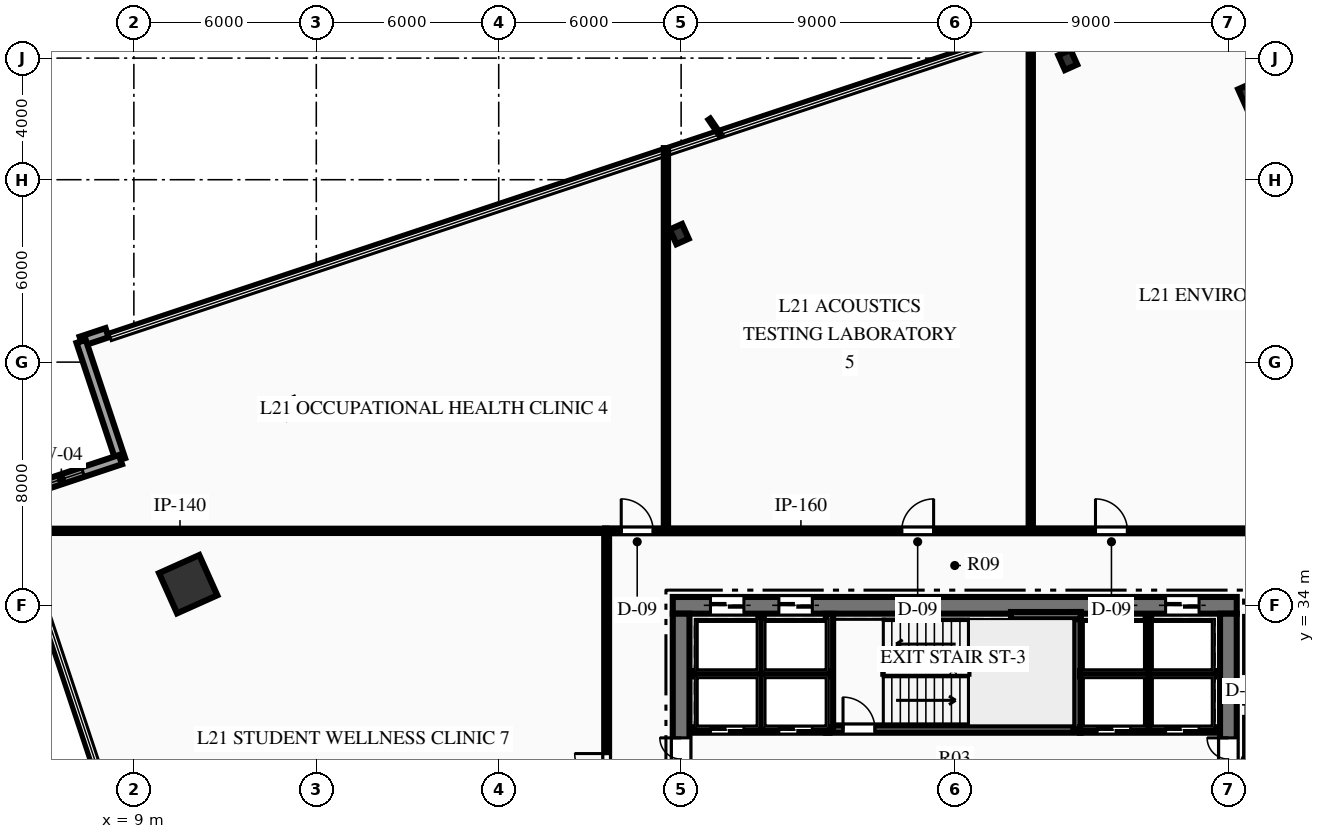
"""IFC4 building model, lengths in metres.
Left out: names, types, materials, properties, quantities, classifications, styles, units other than length and angle.
Written with IfcOpenShell. Run it as: python <this file> out.ifc"""

import sys

from ifc_helpers import new_model, si_unit, direction, frame, frame_2d, origin, origin_2d, place, context, subcontext, project, spatial, rectangle, hollow_rectangle, i_section, extrude, element, fill, save


model = new_model("IFC4")
c1 = context("Model", 3, precision=1e-05, world=origin(), true_north=direction((0.0, 1.0)))
c2 = subcontext(c1, "Body", "Model", "MODEL_VIEW")
j1 = project(units=[si_unit("LENGTHUNIT", "METRE"), si_unit("PLANEANGLEUNIT", "RADIAN")], contexts=[c1])
p1 = place(None, origin())
s1 = spatial("IfcSite", under=j1, at=p1, CompositionType="ELEMENT")
p2 = place(p1, origin())
s2 = spatial("IfcBuilding", under=s1, at=p2, CompositionType="ELEMENT")
p3 = place(p2, frame((0.0, 0.0, 90.45)))
s3 = spatial("IfcBuildingStorey", under=s2, at=p3, CompositionType="ELEMENT", Elevation=90.45)
p4 = place(p3, frame((26.725, 34.0, 0.0), z_axis=(0.0, 0.0, 1.0), x_axis=(1.0, 0.0, 0.0)))
e1 = element("IfcWall", 1, at=p4, inside=s3, PredefinedType="SHEAR", context=c2, shape_type="SweptSolid", body=[
    extrude(rectangle(XDim=18.55, YDim=0.55, at=frame_2d((9.275, 0.0))), origin(), (0.0, 0.0, 1.0), 3.75),
])
p5 = place(p4, frame((1.24, 0.0, 0.0)))
e2 = element("IfcOpeningElement", 2, at=p5, cuts=e1, PredefinedType="OPENING", context=c2, shape_type="SweptSolid", body=[
    extrude(rectangle(XDim=1.1, YDim=2.15, at=frame_2d((0.55, 1.075))), frame((0.0, 0.285, 0.0), z_axis=(0.0, -1.0, 0.0), x_axis=(1.0, 0.0, 0.0)), (0.0, 0.0, 1.0), 0.57),
])
p6 = place(p4, frame((3.49, 0.0, 0.0)))
e3 = element("IfcOpeningElement", 3, at=p6, cuts=e1, PredefinedType="OPENING", context=c2, shape_type="SweptSolid", body=[
    extrude(rectangle(XDim=1.1, YDim=2.15, at=frame_2d((0.55, 1.075))), frame((0.0, 0.285, 0.0), z_axis=(0.0, -1.0, 0.0), x_axis=(1.0, 0.0, 0.0)), (0.0, 0.0, 1.0), 0.57),
])
p7 = place(p4, frame((13.96, 0.0, 0.0)))
e4 = element("IfcOpeningElement", 4, at=p7, cuts=e1, PredefinedType="OPENING", context=c2, shape_type="SweptSolid", body=[
    extrude(rectangle(XDim=1.1, YDim=2.15, at=frame_2d((0.55, 1.075))), frame((0.0, 0.285, 0.0), z_axis=(0.0, -1.0, 0.0), x_axis=(1.0, 0.0, 0.0)), (0.0, 0.0, 1.0), 0.57),
])
p8 = place(p4, frame((16.21, 0.0, 0.0)))
e5 = element("IfcOpeningElement", 5, at=p8, cuts=e1, PredefinedType="OPENING", context=c2, shape_type="SweptSolid", body=[
    extrude(rectangle(XDim=1.1, YDim=2.15, at=frame_2d((0.55, 1.075))), frame((0.0, 0.285, 0.0), z_axis=(0.0, -1.0, 0.0), x_axis=(1.0, 0.0, 0.0)), (0.0, 0.0, 1.0), 0.57),
])
p9 = place(p3, frame((27.0, 18.275, 0.0), z_axis=(0.0, 0.0, 1.0), x_axis=(0.0, 1.0, 0.0)))
e6 = element("IfcWall", 6, at=p9, inside=s3, PredefinedType="SHEAR", context=c2, shape_type="SweptSolid", body=[
    extrude(rectangle(XDim=15.45, YDim=0.55, at=frame_2d((7.725, 0.0))), origin(), (0.0, 0.0, 1.0), 3.75),
])
p10 = place(p9, frame((9.965, 0.0, 0.0)))
e7 = element("IfcOpeningElement", 7, at=p10, cuts=e6, PredefinedType="OPENING", context=c2, shape_type="SweptSolid", body=[
    extrude(rectangle(XDim=1.4, YDim=2.2, at=frame_2d((0.7, 1.1))), frame((0.0, 0.285, 0.0), z_axis=(0.0, -1.0, 0.0), x_axis=(1.0, 0.0, 0.0)), (0.0, 0.0, 1.0), 0.57),
])
p11 = place(p3, frame((45.0, 18.275, 0.0), z_axis=(0.0, 0.0, 1.0), x_axis=(0.0, 1.0, 0.0)))
e8 = element("IfcWall", 8, at=p11, inside=s3, PredefinedType="SHEAR", context=c2, shape_type="SweptSolid", body=[
    extrude(rectangle(XDim=15.45, YDim=0.55, at=frame_2d((7.725, 0.0))), origin(), (0.0, 0.0, 1.0), 3.75),
])
p12 = place(p11, frame((9.965, 0.0, 0.0)))
e9 = element("IfcOpeningElement", 9, at=p12, cuts=e8, PredefinedType="OPENING", context=c2, shape_type="SweptSolid", body=[
    extrude(rectangle(XDim=1.4, YDim=2.2, at=frame_2d((0.7, 1.1))), frame((0.0, 0.285, 0.0), z_axis=(0.0, -1.0, 0.0), x_axis=(1.0, 0.0, 0.0)), (0.0, 0.0, 1.0), 0.57),
])
p13 = place(p3, frame((31.76, 29.93, 0.0), z_axis=(0.0, 0.0, 1.0), x_axis=(1.0, 0.0, 0.0)))
e10 = element("IfcWall", 10, at=p13, inside=s3, PredefinedType="SHEAR", context=c2, shape_type="SweptSolid", body=[
    extrude(rectangle(XDim=8.38, YDim=0.24, at=frame_2d((4.19, 0.0))), origin(), (0.0, 0.0, 1.0), 3.75),
])
p14 = place(p13, frame((0.565, 0.0, 0.0)))
e11 = element("IfcOpeningElement", 11, at=p14, cuts=e10, PredefinedType="OPENING", context=c2, shape_type="SweptSolid", body=[
    extrude(rectangle(XDim=1.05, YDim=2.15, at=frame_2d((0.525, 1.075))), frame((0.0, 0.13, 0.0), z_axis=(0.0, -1.0, 0.0), x_axis=(1.0, 0.0, 0.0)), (0.0, 0.0, 1.0), 0.26),
])
p15 = place(p3, frame((31.88, 29.93, 0.0), z_axis=(0.0, 0.0, 1.0), x_axis=(0.0, 1.0, 0.0)))
e12 = element("IfcWall", 12, at=p15, inside=s3, PredefinedType="SHEAR", context=c2, shape_type="SweptSolid", body=[
    extrude(rectangle(XDim=3.79, YDim=0.24, at=frame_2d((1.895, 0.0))), origin(), (0.0, 0.0, 1.0), 3.75),
])
p16 = place(p3, frame((40.02, 29.93, 0.0), z_axis=(0.0, 0.0, 1.0), x_axis=(0.0, 1.0, 0.0)))
e13 = element("IfcWall", 13, at=p16, inside=s3, PredefinedType="SHEAR", context=c2, shape_type="SweptSolid", body=[
    extrude(rectangle(XDim=3.85, YDim=0.24, at=frame_2d((1.925, 0.0))), origin(), (0.0, 0.0, 1.0), 3.75),
])
p17 = place(p3, frame((37.85, 33.66, 0.0), z_axis=(0.0, 0.0, 1.0), x_axis=(1.0, 0.0, 0.0)))
e14 = element("IfcWall", 14, at=p17, inside=s3, PredefinedType="SHEAR", context=c2, shape_type="SweptSolid", body=[
    extrude(rectangle(XDim=2.29, YDim=0.24, at=frame_2d((1.145, 0.0))), origin(), (0.0, 0.0, 1.0), 3.75),
])
for number, where, z_axis, x_axis in (
    (15, (46.281, 50.61, 0.0), (0.0, 0.0, 1.0), (0.912, 0.409, 0.0)),
    (16, (10.786, 34.695, 0.0), (0.0, 0.0, 1.0), (0.912, 0.409, 0.0)),
):
    element("IfcColumn", number, at=place(p3, frame(where, z_axis=z_axis, x_axis=x_axis)), inside=s3, PredefinedType="COLUMN", context=c2, shape_type="SweptSolid", body=[
        extrude(hollow_rectangle(XDim=1.45, YDim=1.45, WallThickness=0.07, at=origin_2d()), origin(), (0.0, 0.0, 1.0), 3.75),
    ])
for number, where, z_axis, x_axis in (
    (17, (39.716, 51.941, 0.0), (0.0, 0.0, 1.0), (0.912, 0.409, 0.0)),
    (18, (26.938, 46.211, 0.0), (0.0, 0.0, 1.0), (0.912, 0.409, 0.0)),
    (19, (14.159, 40.482, 0.0), (0.0, 0.0, 1.0), (0.912, 0.409, 0.0)),
):
    element("IfcColumn", number, at=place(p3, frame(where, z_axis=z_axis, x_axis=x_axis)), inside=s3, PredefinedType="COLUMN", context=c2, shape_type="SweptSolid", body=[
        extrude(i_section(OverallWidth=0.442, OverallDepth=0.531, WebThickness=0.066, FlangeThickness=0.106, at=origin_2d()), origin(), (0.0, 0.0, 1.0), 3.75),
    ])
p18 = place(p3, frame((7.265, 42.683, 0.0), z_axis=(0.0, 0.0, 1.0), x_axis=(0.948845924708, 0.315739467227, 0.0)))
e20 = element("IfcWall", 20, at=p18, inside=s3, PredefinedType="STANDARD", context=c2, shape_type="SweptSolid", body=[
    extrude(rectangle(XDim=0.9, YDim=0.32, at=frame_2d((0.45, 0.0))), origin(), (0.0, 0.0, 1.0), 3.45),
])
p19 = place(p3, frame((8.559, 38.792, 0.0), z_axis=(0.0, 0.0, 1.0), x_axis=(-0.315602447205, 0.948891508719, 0.0)))
e21 = element("IfcWall", 21, at=p19, inside=s3, PredefinedType="STANDARD", context=c2, shape_type="SweptSolid", body=[
    extrude(rectangle(XDim=4.1, YDim=0.32, at=frame_2d((2.05, 0.0))), origin(), (0.0, 0.0, 1.0), 3.45),
])
p20 = place(p3, frame((4.669, 37.498, 0.0), z_axis=(0.0, 0.0, 1.0), x_axis=(0.948891508719, 0.315602447205, 0.0)))
e22 = element("IfcWall", 22, at=p20, inside=s3, PredefinedType="STANDARD", context=c2, shape_type="SweptSolid", body=[
    extrude(rectangle(XDim=4.1, YDim=0.32, at=frame_2d((2.05, 0.0))), origin(), (0.0, 0.0, 1.0), 3.45),
])
p21 = place(p20, frame((1.3, 0.0, 0.85)))
e23 = element("IfcOpeningElement", 23, at=p21, cuts=e22, PredefinedType="OPENING", context=c2, shape_type="SweptSolid", body=[
    extrude(rectangle(XDim=1.5, YDim=2.1, at=frame_2d((0.75, 1.05))), frame((0.0, 0.17, 0.0), z_axis=(0.0, -1.0, 0.0), x_axis=(1.0, 0.0, 0.0)), (0.0, 0.0, 1.0), 0.34),
])
p22 = place(p3, frame((27.45, 29.9, 0.0), z_axis=(0.0, 0.0, 1.0), x_axis=(1.0, 0.0, 0.0)))
e24 = element("IfcWall", 24, at=p22, inside=s3, PredefinedType="PARTITIONING", context=c2, shape_type="SweptSolid", body=[
    extrude(rectangle(XDim=4.43, YDim=0.18, at=frame_2d((2.215, 0.0))), origin(), (0.0, 0.0, 1.0), 3.45),
])
p23 = place(p22, frame((0.515, 0.0, 0.0)))
e25 = element("IfcOpeningElement", 25, at=p23, cuts=e24, PredefinedType="OPENING", context=c2, shape_type="SweptSolid", body=[
    extrude(rectangle(XDim=1.1, YDim=2.15, at=frame_2d((0.55, 1.075))), frame((0.0, 0.1, 0.0), z_axis=(0.0, -1.0, 0.0), x_axis=(1.0, 0.0, 0.0)), (0.0, 0.0, 1.0), 0.2),
])
p24 = place(p22, frame((2.765, 0.0, 0.0)))
e26 = element("IfcOpeningElement", 26, at=p24, cuts=e24, PredefinedType="OPENING", context=c2, shape_type="SweptSolid", body=[
    extrude(rectangle(XDim=1.1, YDim=2.15, at=frame_2d((0.55, 1.075))), frame((0.0, 0.1, 0.0), z_axis=(0.0, -1.0, 0.0), x_axis=(1.0, 0.0, 0.0)), (0.0, 0.0, 1.0), 0.2),
])
p25 = place(p3, frame((27.45, 31.75, 0.0), z_axis=(0.0, 0.0, 1.0), x_axis=(1.0, 0.0, 0.0)))
e27 = element("IfcWall", 27, at=p25, inside=s3, PredefinedType="PARTITIONING", context=c2, shape_type="SweptSolid", body=[
    extrude(rectangle(XDim=4.43, YDim=0.18, at=frame_2d((2.215, 0.0))), origin(), (0.0, 0.0, 1.0), 3.45),
])
p26 = place(p3, frame((29.63, 29.9, 0.0), z_axis=(0.0, 0.0, 1.0), x_axis=(0.0, 1.0, 0.0)))
e28 = element("IfcWall", 28, at=p26, inside=s3, PredefinedType="PARTITIONING", context=c2, shape_type="SweptSolid", body=[
    extrude(rectangle(XDim=3.75, YDim=0.18, at=frame_2d((1.875, 0.0))), origin(), (0.0, 0.0, 1.0), 3.45),
])
p27 = place(p3, frame((40.12, 29.9, 0.0), z_axis=(0.0, 0.0, 1.0), x_axis=(1.0, 0.0, 0.0)))
e29 = element("IfcWall", 29, at=p27, inside=s3, PredefinedType="PARTITIONING", context=c2, shape_type="SweptSolid", body=[
    extrude(rectangle(XDim=4.43, YDim=0.18, at=frame_2d((2.215, 0.0))), origin(), (0.0, 0.0, 1.0), 3.45),
])
p28 = place(p27, frame((0.565, 0.0, 0.0)))
e30 = element("IfcOpeningElement", 30, at=p28, cuts=e29, PredefinedType="OPENING", context=c2, shape_type="SweptSolid", body=[
    extrude(rectangle(XDim=1.1, YDim=2.15, at=frame_2d((0.55, 1.075))), frame((0.0, 0.1, 0.0), z_axis=(0.0, -1.0, 0.0), x_axis=(1.0, 0.0, 0.0)), (0.0, 0.0, 1.0), 0.2),
])
p29 = place(p27, frame((2.815, 0.0, 0.0)))
e31 = element("IfcOpeningElement", 31, at=p29, cuts=e29, PredefinedType="OPENING", context=c2, shape_type="SweptSolid", body=[
    extrude(rectangle(XDim=1.1, YDim=2.15, at=frame_2d((0.55, 1.075))), frame((0.0, 0.1, 0.0), z_axis=(0.0, -1.0, 0.0), x_axis=(1.0, 0.0, 0.0)), (0.0, 0.0, 1.0), 0.2),
])
p30 = place(p3, frame((40.12, 31.75, 0.0), z_axis=(0.0, 0.0, 1.0), x_axis=(1.0, 0.0, 0.0)))
e32 = element("IfcWall", 32, at=p30, inside=s3, PredefinedType="PARTITIONING", context=c2, shape_type="SweptSolid", body=[
    extrude(rectangle(XDim=4.43, YDim=0.18, at=frame_2d((2.215, 0.0))), origin(), (0.0, 0.0, 1.0), 3.45),
])
p31 = place(p3, frame((42.37, 29.9, 0.0), z_axis=(0.0, 0.0, 1.0), x_axis=(0.0, 1.0, 0.0)))
e33 = element("IfcWall", 33, at=p31, inside=s3, PredefinedType="PARTITIONING", context=c2, shape_type="SweptSolid", body=[
    extrude(rectangle(XDim=3.75, YDim=0.18, at=frame_2d((1.875, 0.0))), origin(), (0.0, 0.0, 1.0), 3.45),
])
p32 = place(p3, frame((24.5, 36.45, 0.0), z_axis=(0.0, 0.0, 1.0), x_axis=(1.0, 0.0, 0.0)))
e34 = element("IfcWall", 34, at=p32, inside=s3, PredefinedType="PARTITIONING", context=c2, shape_type="SweptSolid", body=[
    extrude(rectangle(XDim=23.0, YDim=0.16, at=frame_2d((11.5, 0.0))), origin(), (0.0, 0.0, 1.0), 3.45),
])
p33 = place(p32, frame((0.53, 0.0, 0.0)))
e35 = element("IfcOpeningElement", 35, at=p33, cuts=e34, PredefinedType="OPENING", context=c2, shape_type="SweptSolid", body=[
    extrude(rectangle(XDim=1.05, YDim=2.15, at=frame_2d((0.525, 1.075))), frame((0.0, 0.09, 0.0), z_axis=(0.0, -1.0, 0.0), x_axis=(1.0, 0.0, 0.0)), (0.0, 0.0, 1.0), 0.18),
])
p34 = place(p32, frame((9.755, 0.0, 0.0)))
e36 = element("IfcOpeningElement", 36, at=p34, cuts=e34, PredefinedType="OPENING", context=c2, shape_type="SweptSolid", body=[
    extrude(rectangle(XDim=1.05, YDim=2.15, at=frame_2d((0.525, 1.075))), frame((0.0, 0.09, 0.0), z_axis=(0.0, -1.0, 0.0), x_axis=(1.0, 0.0, 0.0)), (0.0, 0.0, 1.0), 0.18),
])
p35 = place(p32, frame((16.129, 0.0, 0.0)))
e37 = element("IfcOpeningElement", 37, at=p35, cuts=e34, PredefinedType="OPENING", context=c2, shape_type="SweptSolid", body=[
    extrude(rectangle(XDim=1.05, YDim=2.15, at=frame_2d((0.525, 1.075))), frame((0.0, 0.09, 0.0), z_axis=(0.0, -1.0, 0.0), x_axis=(1.0, 0.0, 0.0)), (0.0, 0.0, 1.0), 0.18),
])
p36 = place(p3, frame((24.55, 15.55, 0.0), z_axis=(0.0, 0.0, 1.0), x_axis=(0.0, 1.0, 0.0)))
e38 = element("IfcWall", 38, at=p36, inside=s3, PredefinedType="PARTITIONING", context=c2, shape_type="SweptSolid", body=[
    extrude(rectangle(XDim=20.9, YDim=0.16, at=frame_2d((10.45, 0.0))), origin(), (0.0, 0.0, 1.0), 3.45),
])
p37 = place(p36, frame((5.075, 0.0, 0.0)))
e39 = element("IfcOpeningElement", 39, at=p37, cuts=e38, PredefinedType="OPENING", context=c2, shape_type="SweptSolid", body=[
    extrude(rectangle(XDim=0.95, YDim=2.15, at=frame_2d((0.475, 1.075))), frame((0.0, 0.09, 0.0), z_axis=(0.0, -1.0, 0.0), x_axis=(1.0, 0.0, 0.0)), (0.0, 0.0, 1.0), 0.18),
])
p38 = place(p36, frame((12.524, 0.0, 0.0)))
e40 = element("IfcOpeningElement", 40, at=p38, cuts=e38, PredefinedType="OPENING", context=c2, shape_type="SweptSolid", body=[
    extrude(rectangle(XDim=1.05, YDim=2.15, at=frame_2d((0.525, 1.075))), frame((0.0, 0.09, 0.0), z_axis=(0.0, -1.0, 0.0), x_axis=(1.0, 0.0, 0.0)), (0.0, 0.0, 1.0), 0.18),
])
p39 = place(p3, frame((5.06, 36.45, 0.0), z_axis=(0.0, 0.0, 1.0), x_axis=(1.0, 0.0, 0.0)))
e41 = element("IfcWall", 41, at=p39, inside=s3, PredefinedType="PARTITIONING", context=c2, shape_type="SweptSolid", body=[
    extrude(rectangle(XDim=19.49, YDim=0.14, at=frame_2d((9.745, 0.0))), origin(), (0.0, 0.0, 1.0), 3.45),
])
p40 = place(p3, frame((26.5, 36.45, 0.0), z_axis=(0.0, 0.0, 1.0), x_axis=(0.0, 1.0, 0.0)))
e42 = element("IfcWall", 42, at=p40, inside=s3, PredefinedType="PARTITIONING", context=c2, shape_type="SweptSolid", body=[
    extrude(rectangle(XDim=12.589, YDim=0.14, at=frame_2d((6.295, 0.0))), origin(), (0.0, 0.0, 1.0), 3.45),
])
p41 = place(p3, frame((38.5, 36.45, 0.0), z_axis=(0.0, 0.0, 1.0), x_axis=(0.0, 1.0, 0.0)))
e43 = element("IfcWall", 43, at=p41, inside=s3, PredefinedType="PARTITIONING", context=c2, shape_type="SweptSolid", body=[
    extrude(rectangle(XDim=16.581, YDim=0.14, at=frame_2d((8.291, 0.0))), origin(), (0.0, 0.0, 1.0), 3.45),
])
p42 = place(p21, origin())
e44 = element("IfcWindow", 44, at=p42, inside=s3, PartitioningType="SINGLE_PANEL", PredefinedType="WINDOW", context=c2, shape_type="SweptSolid", body=[
    extrude(rectangle(XDim=1.5, YDim=2.1, at=frame_2d((0.75, 1.05))), frame((0.0, 0.03, 0.0), z_axis=(0.0, -1.0, 0.0), x_axis=(1.0, 0.0, 0.0)), (0.0, 0.0, 1.0), 0.06),
])
fill(e23, e44)
p43 = place(p14, origin())
e45 = element("IfcDoor", 45, at=p43, inside=s3, OperationType="SINGLE_SWING_LEFT", PredefinedType="DOOR", context=c2, shape_type="SweptSolid", body=[
    extrude(rectangle(XDim=1.05, YDim=2.15, at=frame_2d((0.525, 1.075))), frame((0.0, 0.025, 0.0), z_axis=(0.0, -1.0, 0.0), x_axis=(1.0, 0.0, 0.0)), (0.0, 0.0, 1.0), 0.05),
])
fill(e11, e45)
p44 = place(p10, origin())
e46 = element("IfcDoor", 46, at=p44, inside=s3, OperationType="DOUBLE_DOOR_SINGLE_SWING", PredefinedType="DOOR", context=c2, shape_type="SweptSolid", body=[
    extrude(rectangle(XDim=1.4, YDim=2.2, at=frame_2d((0.7, 1.1))), frame((0.0, 0.025, 0.0), z_axis=(0.0, -1.0, 0.0), x_axis=(1.0, 0.0, 0.0)), (0.0, 0.0, 1.0), 0.05),
])
fill(e7, e46)
p45 = place(p12, origin())
e47 = element("IfcDoor", 47, at=p45, inside=s3, OperationType="DOUBLE_DOOR_SINGLE_SWING", PredefinedType="DOOR", context=c2, shape_type="SweptSolid", body=[
    extrude(rectangle(XDim=1.4, YDim=2.2, at=frame_2d((0.7, 1.1))), frame((0.0, 0.025, 0.0), z_axis=(0.0, -1.0, 0.0), x_axis=(1.0, 0.0, 0.0)), (0.0, 0.0, 1.0), 0.05),
])
fill(e9, e47)
p46 = place(p33, origin())
e48 = element("IfcDoor", 48, at=p46, inside=s3, OperationType="SINGLE_SWING_LEFT", PredefinedType="DOOR", context=c2, shape_type="SweptSolid", body=[
    extrude(rectangle(XDim=1.05, YDim=2.15, at=frame_2d((0.525, 1.075))), frame((0.0, 0.025, 0.0), z_axis=(0.0, -1.0, 0.0), x_axis=(1.0, 0.0, 0.0)), (0.0, 0.0, 1.0), 0.05),
])
fill(e35, e48)
p47 = place(p34, origin())
e49 = element("IfcDoor", 49, at=p47, inside=s3, OperationType="SINGLE_SWING_RIGHT", PredefinedType="DOOR", context=c2, shape_type="SweptSolid", body=[
    extrude(rectangle(XDim=1.05, YDim=2.15, at=frame_2d((0.525, 1.075))), frame((0.0, 0.025, 0.0), z_axis=(0.0, -1.0, 0.0), x_axis=(1.0, 0.0, 0.0)), (0.0, 0.0, 1.0), 0.05),
])
fill(e36, e49)
p48 = place(p35, origin())
e50 = element("IfcDoor", 50, at=p48, inside=s3, OperationType="SINGLE_SWING_LEFT", PredefinedType="DOOR", context=c2, shape_type="SweptSolid", body=[
    extrude(rectangle(XDim=1.05, YDim=2.15, at=frame_2d((0.525, 1.075))), frame((0.0, 0.025, 0.0), z_axis=(0.0, -1.0, 0.0), x_axis=(1.0, 0.0, 0.0)), (0.0, 0.0, 1.0), 0.05),
])
fill(e37, e50)
p49 = place(p38, origin())
e51 = element("IfcDoor", 51, at=p49, inside=s3, OperationType="SINGLE_SWING_RIGHT", PredefinedType="DOOR", context=c2, shape_type="SweptSolid", body=[
    extrude(rectangle(XDim=1.05, YDim=2.15, at=frame_2d((0.525, 1.075))), frame((0.0, 0.025, 0.0), z_axis=(0.0, -1.0, 0.0), x_axis=(1.0, 0.0, 0.0)), (0.0, 0.0, 1.0), 0.05),
])
fill(e40, e51)
p50 = place(p23, origin())
e52 = element("IfcDoor", 52, at=p50, inside=s3, OperationType="SLIDING_TO_LEFT", PredefinedType="DOOR", context=c2, shape_type="SweptSolid", body=[
    extrude(rectangle(XDim=1.1, YDim=2.15, at=frame_2d((0.55, 1.075))), frame((0.0, 0.025, 0.0), z_axis=(0.0, -1.0, 0.0), x_axis=(1.0, 0.0, 0.0)), (0.0, 0.0, 1.0), 0.05),
])
fill(e25, e52)
p51 = place(p24, origin())
e53 = element("IfcDoor", 53, at=p51, inside=s3, OperationType="SLIDING_TO_LEFT", PredefinedType="DOOR", context=c2, shape_type="SweptSolid", body=[
    extrude(rectangle(XDim=1.1, YDim=2.15, at=frame_2d((0.55, 1.075))), frame((0.0, 0.025, 0.0), z_axis=(0.0, -1.0, 0.0), x_axis=(1.0, 0.0, 0.0)), (0.0, 0.0, 1.0), 0.05),
])
fill(e26, e53)
p52 = place(p5, origin())
e54 = element("IfcDoor", 54, at=p52, inside=s3, OperationType="SLIDING_TO_LEFT", PredefinedType="DOOR", context=c2, shape_type="SweptSolid", body=[
    extrude(rectangle(XDim=1.1, YDim=2.15, at=frame_2d((0.55, 1.075))), frame((0.0, 0.025, 0.0), z_axis=(0.0, -1.0, 0.0), x_axis=(1.0, 0.0, 0.0)), (0.0, 0.0, 1.0), 0.05),
])
fill(e2, e54)
p53 = place(p6, origin())
e55 = element("IfcDoor", 55, at=p53, inside=s3, OperationType="SLIDING_TO_LEFT", PredefinedType="DOOR", context=c2, shape_type="SweptSolid", body=[
    extrude(rectangle(XDim=1.1, YDim=2.15, at=frame_2d((0.55, 1.075))), frame((0.0, 0.025, 0.0), z_axis=(0.0, -1.0, 0.0), x_axis=(1.0, 0.0, 0.0)), (0.0, 0.0, 1.0), 0.05),
])
fill(e3, e55)
p54 = place(p28, origin())
e56 = element("IfcDoor", 56, at=p54, inside=s3, OperationType="SLIDING_TO_LEFT", PredefinedType="DOOR", context=c2, shape_type="SweptSolid", body=[
    extrude(rectangle(XDim=1.1, YDim=2.15, at=frame_2d((0.55, 1.075))), frame((0.0, 0.025, 0.0), z_axis=(0.0, -1.0, 0.0), x_axis=(1.0, 0.0, 0.0)), (0.0, 0.0, 1.0), 0.05),
])
fill(e30, e56)
p55 = place(p29, origin())
e57 = element("IfcDoor", 57, at=p55, inside=s3, OperationType="SLIDING_TO_LEFT", PredefinedType="DOOR", context=c2, shape_type="SweptSolid", body=[
    extrude(rectangle(XDim=1.1, YDim=2.15, at=frame_2d((0.55, 1.075))), frame((0.0, 0.025, 0.0), z_axis=(0.0, -1.0, 0.0), x_axis=(1.0, 0.0, 0.0)), (0.0, 0.0, 1.0), 0.05),
])
fill(e31, e57)
p56 = place(p7, origin())
e58 = element("IfcDoor", 58, at=p56, inside=s3, OperationType="SLIDING_TO_LEFT", PredefinedType="DOOR", context=c2, shape_type="SweptSolid", body=[
    extrude(rectangle(XDim=1.1, YDim=2.15, at=frame_2d((0.55, 1.075))), frame((0.0, 0.025, 0.0), z_axis=(0.0, -1.0, 0.0), x_axis=(1.0, 0.0, 0.0)), (0.0, 0.0, 1.0), 0.05),
])
fill(e4, e58)
p57 = place(p8, origin())
e59 = element("IfcDoor", 59, at=p57, inside=s3, OperationType="SLIDING_TO_LEFT", PredefinedType="DOOR", context=c2, shape_type="SweptSolid", body=[
    extrude(rectangle(XDim=1.1, YDim=2.15, at=frame_2d((0.55, 1.075))), frame((0.0, 0.025, 0.0), z_axis=(0.0, -1.0, 0.0), x_axis=(1.0, 0.0, 0.0)), (0.0, 0.0, 1.0), 0.05),
])
fill(e5, e59)
save(model, sys.argv[1])
